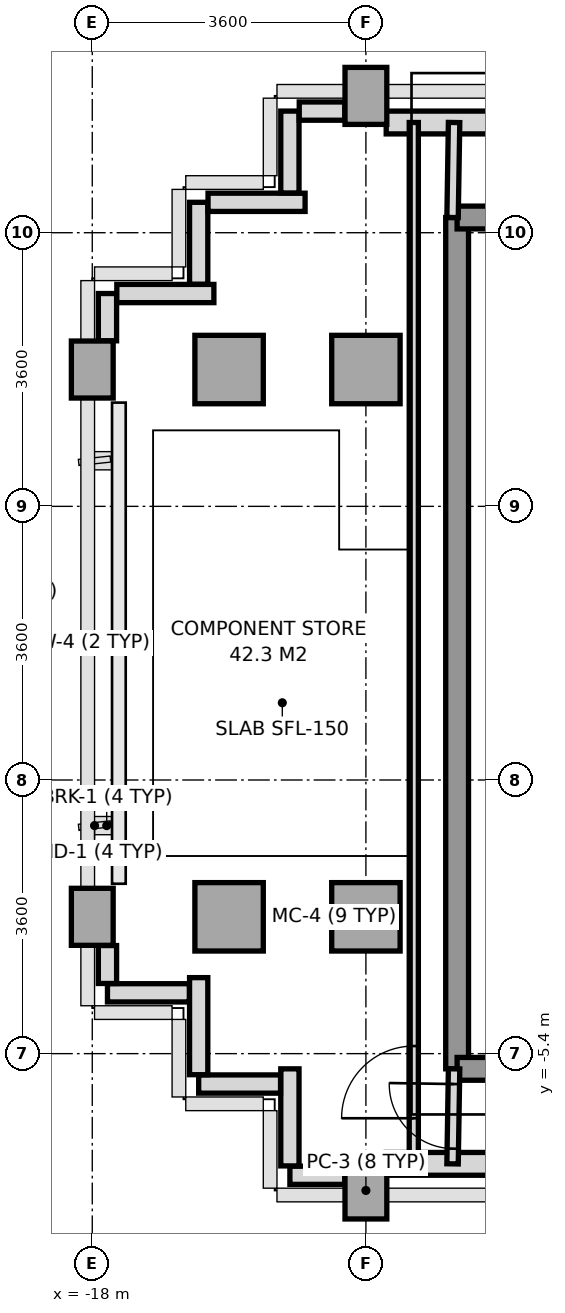
"""IFC4 building model, lengths in metres.
Left out: names, types, materials, properties, quantities, classifications, styles, units other than length and angle.
Written with IfcOpenShell. Run it as: python <this file> out.ifc"""

import sys

from ifc_helpers import new_model, si_unit, direction, frame, frame_2d, origin, origin_2d, place, context, subcontext, project, spatial, rectangle, extrude, source, transform, mapped, element, fill, save


model = new_model("IFC4")
c1 = context("Model", 3, precision=1e-05, world=origin(), true_north=direction((0.0, 1.0)))
c2 = subcontext(c1, "Body", "Model", "MODEL_VIEW")
j1 = project(units=[si_unit("LENGTHUNIT", "METRE"), si_unit("PLANEANGLEUNIT", "RADIAN")], contexts=[c1])
p1 = place(None, origin())
s1 = spatial("IfcSite", under=j1, at=p1, CompositionType="ELEMENT")
p2 = place(p1, origin())
s2 = spatial("IfcBuilding", under=s1, at=p2, CompositionType="ELEMENT")
p3 = place(p2, frame((0.0, 0.0, 233.2)))
s3 = spatial("IfcBuildingStorey", under=s2, at=p3, CompositionType="ELEMENT", Elevation=233.2)
m1 = source(origin(), c2, "Body", "SweptSolid", [
    extrude(rectangle(XDim=0.55, YDim=0.75, at=origin_2d()), origin(), (0.0, 0.0, 1.0), 3.01),
])
for number, where, z_axis, x_axis in (
    (1, (-18.0, -3.6, 0.0), (0.0, 0.0, 1.0), (1.0, 0.0, 0.0)),
    (2, (-18.0, 3.6, 0.0), (0.0, 0.0, 1.0), (1.0, 0.0, 0.0)),
):
    element("IfcColumn", number, at=place(p3, frame(where, z_axis=z_axis, x_axis=x_axis)), inside=s3, PredefinedType="COLUMN", context=c2, shape_type="MappedRepresentation", body=[
        mapped(m1, transform((0.0, 0.0, 0.0), x_axis=(1.0, 0.0, 0.0), y_axis=(0.0, 1.0, 0.0), z_axis=(0.0, 0.0, 1.0), scale=1.0)),
    ])
m2 = source(origin(), c2, "Body", "SweptSolid", [
    extrude(rectangle(XDim=0.9, YDim=0.9, at=origin_2d()), origin(), (0.0, 0.0, 1.0), 3.01),
])
for number, where, z_axis, x_axis in (
    (3, (-16.2, -3.6, 0.0), (0.0, 0.0, 1.0), (1.0, 0.0, 0.0)),
    (4, (-16.2, 3.6, 0.0), (0.0, 0.0, 1.0), (1.0, 0.0, 0.0)),
):
    element("IfcColumn", number, at=place(p3, frame(where, z_axis=z_axis, x_axis=x_axis)), inside=s3, PredefinedType="COLUMN", context=c2, shape_type="MappedRepresentation", body=[
        mapped(m2, transform((0.0, 0.0, 0.0), x_axis=(1.0, 0.0, 0.0), y_axis=(0.0, 1.0, 0.0), z_axis=(0.0, 0.0, 1.0), scale=1.0)),
    ])
p4 = place(p3, frame((-14.4, -7.2, 0.0), z_axis=(0.0, 0.0, 1.0), x_axis=(1.0, 0.0, 0.0)))
e5 = element("IfcColumn", 5, at=p4, inside=s3, PredefinedType="COLUMN", context=c2, shape_type="MappedRepresentation", body=[
    mapped(m1, transform((0.0, 0.0, 0.0), x_axis=(1.0, 0.0, 0.0), y_axis=(0.0, 1.0, 0.0), z_axis=(0.0, 0.0, 1.0), scale=1.0)),
])
for number, where, z_axis, x_axis in (
    (6, (-14.4, -3.6, 0.0), (0.0, 0.0, 1.0), (1.0, 0.0, 0.0)),
    (7, (-14.4, 3.6, 0.0), (0.0, 0.0, 1.0), (1.0, 0.0, 0.0)),
):
    element("IfcColumn", number, at=place(p3, frame(where, z_axis=z_axis, x_axis=x_axis)), inside=s3, PredefinedType="COLUMN", context=c2, shape_type="MappedRepresentation", body=[
        mapped(m2, transform((0.0, 0.0, 0.0), x_axis=(1.0, 0.0, 0.0), y_axis=(0.0, 1.0, 0.0), z_axis=(0.0, 0.0, 1.0), scale=1.0)),
    ])
p5 = place(p3, frame((-14.4, 7.2, 0.0), z_axis=(0.0, 0.0, 1.0), x_axis=(1.0, 0.0, 0.0)))
e8 = element("IfcColumn", 8, at=p5, inside=s3, PredefinedType="COLUMN", context=c2, shape_type="MappedRepresentation", body=[
    mapped(m1, transform((0.0, 0.0, 0.0), x_axis=(1.0, 0.0, 0.0), y_axis=(0.0, 1.0, 0.0), z_axis=(0.0, 0.0, 1.0), scale=1.0)),
])
p6 = place(p3, frame((-14.133, 6.85, 0.0), z_axis=(0.0, 0.0, 1.0), x_axis=(1.0, 0.0, 0.0)))
e9 = element("IfcWall", 9, at=p6, inside=s3, PredefinedType="SOLIDWALL", context=c2, shape_type="SweptSolid", body=[
    extrude(rectangle(XDim=2.685, YDim=0.3, at=frame_2d((1.343, 0.0))), origin(), (0.0, 0.0, 1.0), 2.57),
])
p7 = place(p3, frame((-14.133, -6.85, 0.0), z_axis=(0.0, 0.0, 1.0), x_axis=(1.0, 0.0, 0.0)))
e10 = element("IfcWall", 10, at=p7, inside=s3, PredefinedType="SOLIDWALL", context=c2, shape_type="SweptSolid", body=[
    extrude(rectangle(XDim=2.383, YDim=0.3, at=frame_2d((1.191, 0.0))), origin(), (0.0, 0.0, 1.0), 2.57),
])
p8 = place(p3, frame((-14.678, -7.0, 0.0), z_axis=(0.0, 0.0, 1.0), x_axis=(-1.0, 0.0, 0.0)))
e11 = element("IfcWall", 11, at=p8, inside=s3, PredefinedType="PARAPET", context=c2, shape_type="SweptSolid", body=[
    extrude(rectangle(XDim=0.722, YDim=0.24, at=frame_2d((0.361, 0.0))), origin(), (0.0, 0.0, 1.0), 1.15),
])
p9 = place(p3, frame((-15.4, -6.877, 0.0), z_axis=(0.0, 0.0, 1.0), x_axis=(0.0, 1.0, 0.0)))
e12 = element("IfcWall", 12, at=p9, inside=s3, PredefinedType="PARAPET", context=c2, shape_type="SweptSolid", body=[
    extrude(rectangle(XDim=1.277, YDim=0.24, at=frame_2d((0.638, 0.0))), origin(), (0.0, 0.0, 1.0), 1.15),
])
p10 = place(p3, frame((-15.523, -5.8, 0.0), z_axis=(0.0, 0.0, 1.0), x_axis=(-1.0, 0.0, 0.0)))
e13 = element("IfcWall", 13, at=p10, inside=s3, PredefinedType="PARAPET", context=c2, shape_type="SweptSolid", body=[
    extrude(rectangle(XDim=1.077, YDim=0.24, at=frame_2d((0.539, 0.0))), origin(), (0.0, 0.0, 1.0), 1.15),
])
p11 = place(p3, frame((-16.6, -5.677, 0.0), z_axis=(0.0, 0.0, 1.0), x_axis=(0.0, 1.0, 0.0)))
e14 = element("IfcWall", 14, at=p11, inside=s3, PredefinedType="PARAPET", context=c2, shape_type="SweptSolid", body=[
    extrude(rectangle(XDim=1.277, YDim=0.24, at=frame_2d((0.639, 0.0))), origin(), (0.0, 0.0, 1.0), 1.15),
])
p12 = place(p3, frame((-16.723, -4.6, 0.0), z_axis=(0.0, 0.0, 1.0), x_axis=(-1.0, 0.0, 0.0)))
e15 = element("IfcWall", 15, at=p12, inside=s3, PredefinedType="PARAPET", context=c2, shape_type="SweptSolid", body=[
    extrude(rectangle(XDim=1.077, YDim=0.24, at=frame_2d((0.539, 0.0))), origin(), (0.0, 0.0, 1.0), 1.15),
])
p13 = place(p3, frame((-17.8, -4.477, 0.0), z_axis=(0.0, 0.0, 1.0), x_axis=(0.0, 1.0, 0.0)))
e16 = element("IfcWall", 16, at=p13, inside=s3, PredefinedType="PARAPET", context=c2, shape_type="SweptSolid", body=[
    extrude(rectangle(XDim=0.499, YDim=0.24, at=frame_2d((0.25, 0.0))), origin(), (0.0, 0.0, 1.0), 1.15),
])
p14 = place(p3, frame((-17.8, 3.978, 0.0), z_axis=(0.0, 0.0, 1.0), x_axis=(0.0, 1.0, 0.0)))
e17 = element("IfcWall", 17, at=p14, inside=s3, PredefinedType="PARAPET", context=c2, shape_type="SweptSolid", body=[
    extrude(rectangle(XDim=0.622, YDim=0.24, at=frame_2d((0.311, 0.0))), origin(), (0.0, 0.0, 1.0), 1.15),
])
p15 = place(p3, frame((-17.677, 4.6, 0.0), z_axis=(0.0, 0.0, 1.0), x_axis=(1.0, 0.0, 0.0)))
e18 = element("IfcWall", 18, at=p15, inside=s3, PredefinedType="PARAPET", context=c2, shape_type="SweptSolid", body=[
    extrude(rectangle(XDim=1.277, YDim=0.24, at=frame_2d((0.639, 0.0))), origin(), (0.0, 0.0, 1.0), 1.15),
])
p16 = place(p3, frame((-16.6, 4.723, 0.0), z_axis=(0.0, 0.0, 1.0), x_axis=(0.0, 1.0, 0.0)))
e19 = element("IfcWall", 19, at=p16, inside=s3, PredefinedType="PARAPET", context=c2, shape_type="SweptSolid", body=[
    extrude(rectangle(XDim=1.077, YDim=0.24, at=frame_2d((0.539, 0.0))), origin(), (0.0, 0.0, 1.0), 1.15),
])
p17 = place(p3, frame((-16.477, 5.8, 0.0), z_axis=(0.0, 0.0, 1.0), x_axis=(1.0, 0.0, 0.0)))
e20 = element("IfcWall", 20, at=p17, inside=s3, PredefinedType="PARAPET", context=c2, shape_type="SweptSolid", body=[
    extrude(rectangle(XDim=1.277, YDim=0.24, at=frame_2d((0.639, 0.0))), origin(), (0.0, 0.0, 1.0), 1.15),
])
p18 = place(p3, frame((-15.4, 5.923, 0.0), z_axis=(0.0, 0.0, 1.0), x_axis=(0.0, 1.0, 0.0)))
e21 = element("IfcWall", 21, at=p18, inside=s3, PredefinedType="PARAPET", context=c2, shape_type="SweptSolid", body=[
    extrude(rectangle(XDim=1.077, YDim=0.24, at=frame_2d((0.539, 0.0))), origin(), (0.0, 0.0, 1.0), 1.15),
])
p19 = place(p3, frame((-15.277, 7.0, 0.0), z_axis=(0.0, 0.0, 1.0), x_axis=(1.0, 0.0, 0.0)))
e22 = element("IfcWall", 22, at=p19, inside=s3, PredefinedType="PARAPET", context=c2, shape_type="SweptSolid", body=[
    extrude(rectangle(XDim=0.599, YDim=0.24, at=frame_2d((0.3, 0.0))), origin(), (0.0, 0.0, 1.0), 1.15),
])
p20 = place(p3, frame((-13.2, -5.6, 0.0), z_axis=(0.0, 0.0, 1.0), x_axis=(0.0, 1.0, 0.0)))
e23 = element("IfcWall", 23, at=p20, inside=s3, PredefinedType="SHEAR", context=c2, shape_type="SweptSolid", body=[
    extrude(rectangle(XDim=11.2, YDim=0.3, at=frame_2d((5.6, 0.0))), origin(), (0.0, 0.0, 1.0), 3.01),
])
p21 = place(p3, frame((-13.2, 5.6, 0.0), z_axis=(0.0, 0.0, 1.0), x_axis=(1.0, 0.0, 0.0)))
e24 = element("IfcWall", 24, at=p21, inside=s3, PredefinedType="SHEAR", context=c2, shape_type="SweptSolid", body=[
    extrude(rectangle(XDim=1.844, YDim=0.3, at=frame_2d((0.922, 0.0))), origin(), (0.0, 0.0, 1.0), 3.01),
])
p22 = place(p3, frame((-13.2, -5.6, 0.0), z_axis=(0.0, 0.0, 1.0), x_axis=(1.0, 0.0, 0.0)))
e25 = element("IfcWall", 25, at=p22, inside=s3, PredefinedType="SHEAR", context=c2, shape_type="SweptSolid", body=[
    extrude(rectangle(XDim=7.8, YDim=0.3, at=frame_2d((3.9, 0.0))), origin(), (0.0, 0.0, 1.0), 3.01),
])
p23 = place(p3, frame((-13.26, 5.6, 0.0), z_axis=(0.0, 0.0, 1.0), x_axis=(0.016013571389, 0.999871774545, 0.0)))
e26 = element("IfcWall", 26, at=p23, inside=s3, PredefinedType="PARTITIONING", context=c2, shape_type="SweptSolid", body=[
    extrude(rectangle(XDim=1.25, YDim=0.15, at=frame_2d((0.625, 0.0))), origin(), (0.0, 0.0, 1.0), 3.01),
])
p24 = place(p3, frame((-13.26, -6.85, 0.0), z_axis=(0.0, 0.0, 1.0), x_axis=(0.016013571389, 0.999871774545, 0.0)))
e27 = element("IfcWall", 27, at=p24, inside=s3, PredefinedType="PARTITIONING", context=c2, shape_type="SweptSolid", body=[
    extrude(rectangle(XDim=1.25, YDim=0.15, at=frame_2d((0.625, 0.0))), origin(), (0.0, 0.0, 1.0), 3.01),
])
p25 = place(p24, frame((0.2, 0.0, 0.0)))
e28 = element("IfcOpeningElement", 28, at=p25, cuts=e27, PredefinedType="OPENING", context=c2, shape_type="SweptSolid", body=[
    extrude(rectangle(XDim=0.85, YDim=2.1, at=frame_2d((0.425, 1.05))), frame((0.0, 0.085, 0.0), z_axis=(0.0, -1.0, 0.0), x_axis=(1.0, 0.0, 0.0)), (0.0, 0.0, 1.0), 0.17),
])
p26 = place(p3, frame((-13.77, -6.85, 0.0), z_axis=(0.0, 0.0, 1.0), x_axis=(0.0, 1.0, 0.0)))
e29 = element("IfcWall", 29, at=p26, inside=s3, PredefinedType="PARTITIONING", context=c2, shape_type="SweptSolid", body=[
    extrude(rectangle(XDim=13.7, YDim=0.12, at=frame_2d((6.85, 0.0))), origin(), (0.0, 0.0, 1.0), 2.71),
])
p27 = place(p26, frame((0.6, 0.0, 0.0)))
e30 = element("IfcOpeningElement", 30, at=p27, cuts=e29, PredefinedType="OPENING", context=c2, shape_type="SweptSolid", body=[
    extrude(rectangle(XDim=0.95, YDim=2.15, at=frame_2d((0.475, 1.075))), frame((0.0, 0.07, 0.0), z_axis=(0.0, -1.0, 0.0), x_axis=(1.0, 0.0, 0.0)), (0.0, 0.0, 1.0), 0.14),
])
m3 = source(origin(), c2, "Body", "SweptSolid", [
    extrude(rectangle(XDim=0.95, YDim=2.15, at=frame_2d((0.475, 1.075))), frame((0.0, 0.025, 0.0), z_axis=(0.0, -1.0, 0.0), x_axis=(1.0, 0.0, 0.0)), (0.0, 0.0, 1.0), 0.05),
])
p28 = place(p27, origin())
e31 = element("IfcDoor", 31, at=p28, inside=s3, OperationType="SINGLE_SWING_LEFT", PredefinedType="DOOR", context=c2, shape_type="MappedRepresentation", body=[
    mapped(m3, transform((0.0, 0.0, 0.0), x_axis=(1.0, 0.0, 0.0), y_axis=(0.0, 1.0, 0.0), z_axis=(0.0, 0.0, 1.0), scale=1.0)),
])
fill(e30, e31)
m4 = source(origin(), c2, "Body", "SweptSolid", [
    extrude(rectangle(XDim=0.85, YDim=2.1, at=frame_2d((0.425, 1.05))), frame((0.0, 0.025, 0.0), z_axis=(0.0, -1.0, 0.0), x_axis=(1.0, 0.0, 0.0)), (0.0, 0.0, 1.0), 0.05),
])
p29 = place(p25, origin())
e32 = element("IfcDoor", 32, at=p29, inside=s3, OperationType="SINGLE_SWING_RIGHT", PredefinedType="DOOR", context=c2, shape_type="MappedRepresentation", body=[
    mapped(m4, transform((0.0, 0.0, 0.0), x_axis=(1.0, 0.0, 0.0), y_axis=(0.0, 1.0, 0.0), z_axis=(0.0, 0.0, 1.0), scale=1.0)),
])
fill(e28, e32)
save(model, sys.argv[1])
